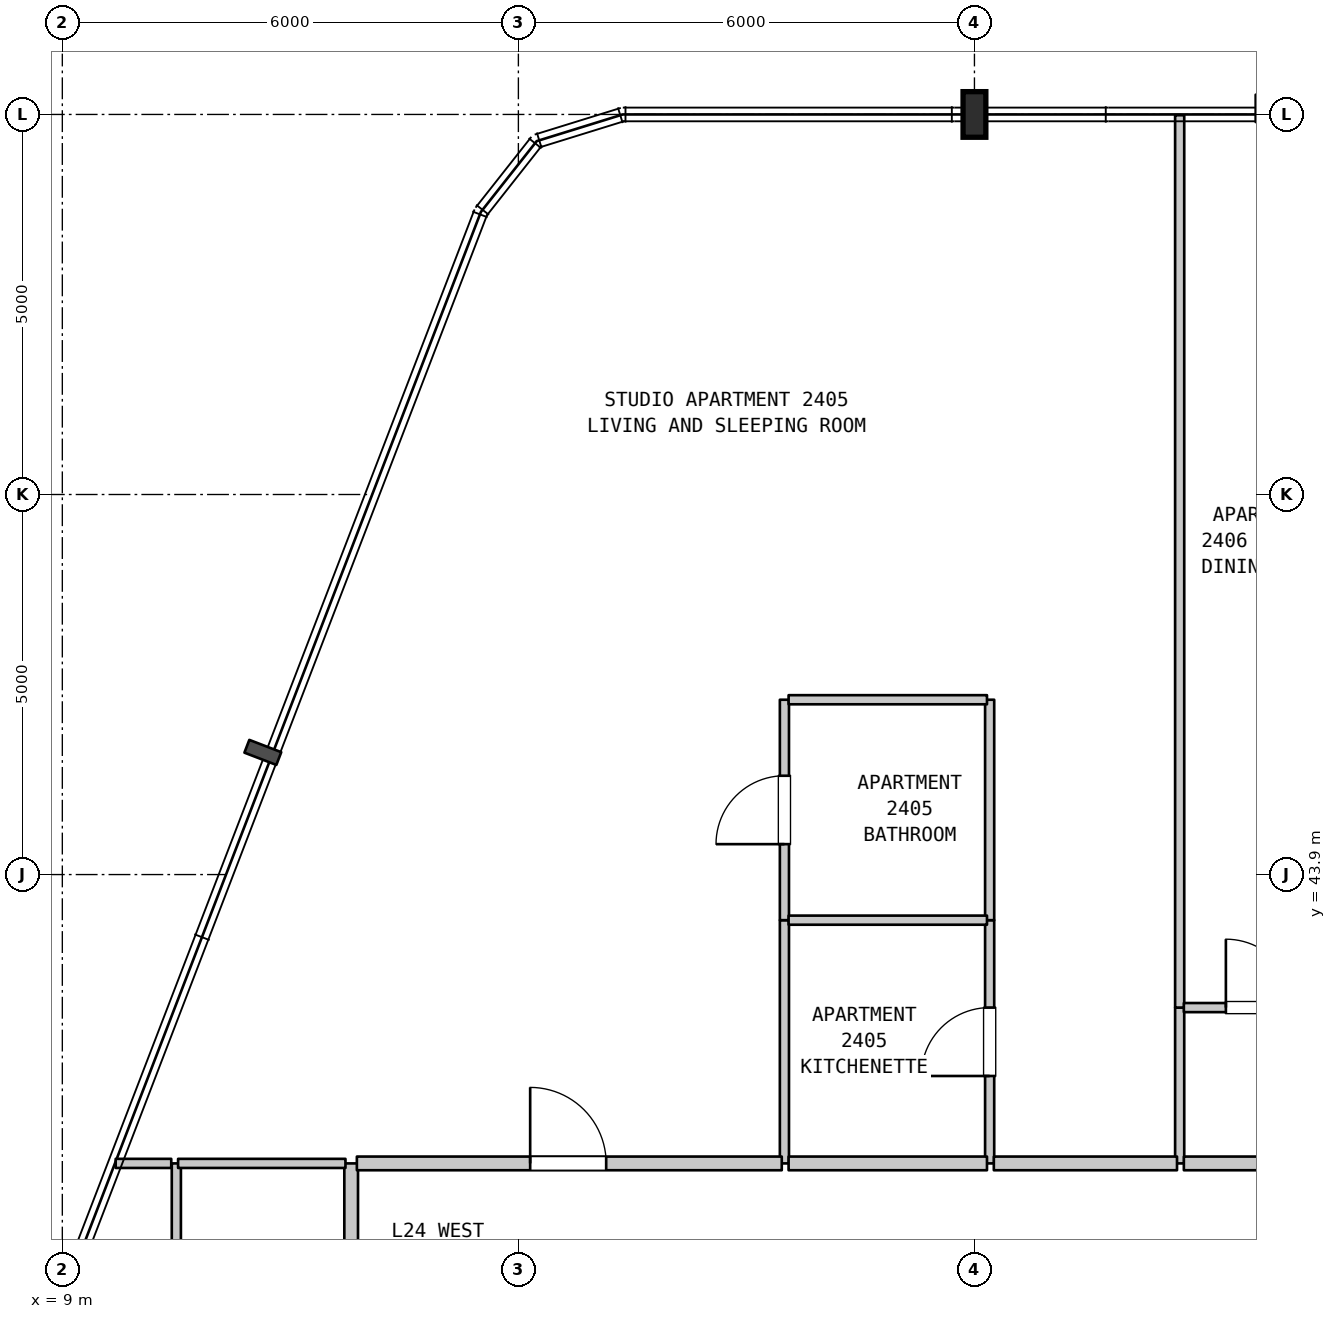
"""IFC4 building model, lengths in metres.
Left out: names, types, materials, properties, quantities, classifications, styles, units other than length and angle.
Written with IfcOpenShell. Run it as: python <this file> out.ifc"""

import sys

from ifc_helpers import new_model, si_unit, direction, frame, frame_2d, origin, origin_2d, place, context, subcontext, project, spatial, rectangle, i_section, extrude, element, fill, save


model = new_model("IFC4")
c1 = context("Model", 3, precision=1e-05, world=origin(), true_north=direction((0.0, 1.0)))
c2 = subcontext(c1, "Body", "Model", "MODEL_VIEW")
j1 = project(units=[si_unit("LENGTHUNIT", "METRE"), si_unit("PLANEANGLEUNIT", "RADIAN")], contexts=[c1])
p1 = place(None, origin())
s1 = spatial("IfcSite", under=j1, at=p1, CompositionType="ELEMENT")
p2 = place(p1, origin())
s2 = spatial("IfcBuilding", under=s1, at=p2, CompositionType="ELEMENT")
p3 = place(p2, frame((0.0, 0.0, 102.0)))
s3 = spatial("IfcBuildingStorey", under=s2, at=p3, CompositionType="ELEMENT", Elevation=102.0)
p4 = place(p3, frame((21.0, 53.9, 0.0), z_axis=(0.0, 0.0, 1.0), x_axis=(1.0, 0.0, 0.0)))
e1 = element("IfcColumn", 1, at=p4, inside=s3, PredefinedType="COLUMN", context=c2, shape_type="SweptSolid", body=[
    extrude(i_section(OverallWidth=0.3, OverallDepth=0.6, WebThickness=0.015, FlangeThickness=0.03, FilletRadius=0.027, at=origin_2d()), origin(), (0.0, 0.0, 1.0), 3.7),
])
p5 = place(p3, frame((10.5, 31.45, 0.0), z_axis=(0.0, 0.0, 1.0), x_axis=(0.0, 1.0, 0.0)))
e2 = element("IfcWall", 2, at=p5, inside=s3, PredefinedType="PARTITIONING", context=c2, shape_type="SweptSolid", body=[
    extrude(rectangle(XDim=8.65, YDim=0.12, at=frame_2d((4.325, 0.0))), origin(), (0.0, 0.0, 1.0), 3.385),
])
p6 = place(p3, frame((12.8, 31.45, 0.0), z_axis=(0.0, 0.0, 1.0), x_axis=(0.0, 1.0, 0.0)))
e3 = element("IfcWall", 3, at=p6, inside=s3, PredefinedType="STANDARD", context=c2, shape_type="SweptSolid", body=[
    extrude(rectangle(XDim=8.65, YDim=0.18, at=frame_2d((4.325, 0.0))), origin(), (0.0, 0.0, 1.0), 3.385),
])
p7 = place(p3, frame((18.5, 40.1, 0.0), z_axis=(0.0, 0.0, 1.0), x_axis=(0.0, 1.0, 0.0)))
e4 = element("IfcWall", 4, at=p7, inside=s3, PredefinedType="PARTITIONING", context=c2, shape_type="SweptSolid", body=[
    extrude(rectangle(XDim=3.2, YDim=0.12, at=frame_2d((1.6, 0.0))), origin(), (0.0, 0.0, 1.0), 3.385),
])
p8 = place(p3, frame((18.5, 43.3, 0.0), z_axis=(0.0, 0.0, 1.0), x_axis=(0.0, 1.0, 0.0)))
e5 = element("IfcWall", 5, at=p8, inside=s3, PredefinedType="PARTITIONING", context=c2, shape_type="SweptSolid", body=[
    extrude(rectangle(XDim=2.9, YDim=0.12, at=frame_2d((1.45, 0.0))), origin(), (0.0, 0.0, 1.0), 3.385),
])
p9 = place(p8, frame((1.0, 0.0, 0.0)))
e6 = element("IfcOpeningElement", 6, at=p9, cuts=e5, PredefinedType="OPENING", context=c2, shape_type="SweptSolid", body=[
    extrude(rectangle(XDim=0.9, YDim=2.1, at=frame_2d((0.45, 1.05))), frame((0.0, 0.07, 0.0), z_axis=(0.0, -1.0, 0.0), x_axis=(1.0, 0.0, 0.0)), (0.0, 0.0, 1.0), 0.14),
])
p10 = place(p3, frame((21.2, 40.1, 0.0), z_axis=(0.0, 0.0, 1.0), x_axis=(0.0, 1.0, 0.0)))
e7 = element("IfcWall", 7, at=p10, inside=s3, PredefinedType="PARTITIONING", context=c2, shape_type="SweptSolid", body=[
    extrude(rectangle(XDim=3.2, YDim=0.12, at=frame_2d((1.6, 0.0))), origin(), (0.0, 0.0, 1.0), 3.385),
])
p11 = place(p10, frame((1.15, 0.0, 0.0)))
e8 = element("IfcOpeningElement", 8, at=p11, cuts=e7, PredefinedType="OPENING", context=c2, shape_type="SweptSolid", body=[
    extrude(rectangle(XDim=0.9, YDim=2.15, at=frame_2d((0.45, 1.075))), frame((0.0, 0.07, 0.0), z_axis=(0.0, -1.0, 0.0), x_axis=(1.0, 0.0, 0.0)), (0.0, 0.0, 1.0), 0.14),
])
p12 = place(p3, frame((21.2, 43.3, 0.0), z_axis=(0.0, 0.0, 1.0), x_axis=(0.0, 1.0, 0.0)))
e9 = element("IfcWall", 9, at=p12, inside=s3, PredefinedType="PARTITIONING", context=c2, shape_type="SweptSolid", body=[
    extrude(rectangle(XDim=2.9, YDim=0.12, at=frame_2d((1.45, 0.0))), origin(), (0.0, 0.0, 1.0), 3.385),
])
p13 = place(p3, frame((23.7, 40.1, 0.0), z_axis=(0.0, 0.0, 1.0), x_axis=(0.0, 1.0, 0.0)))
e10 = element("IfcWall", 10, at=p13, inside=s3, PredefinedType="PARTITIONING", context=c2, shape_type="SweptSolid", body=[
    extrude(rectangle(XDim=2.05, YDim=0.12, at=frame_2d((1.025, 0.0))), origin(), (0.0, 0.0, 1.0), 3.385),
])
p14 = place(p3, frame((23.7, 42.15, 0.0), z_axis=(0.0, 0.0, 1.0), x_axis=(0.0, 1.0, 0.0)))
e11 = element("IfcWall", 11, at=p14, inside=s3, PredefinedType="PARTITIONING", context=c2, shape_type="SweptSolid", body=[
    extrude(rectangle(XDim=11.74, YDim=0.12, at=frame_2d((5.87, 0.0))), origin(), (0.0, 0.0, 1.0), 3.385),
])
p15 = place(p3, frame((9.702, 40.1, 0.0), z_axis=(0.0, 0.0, 1.0), x_axis=(1.0, 0.0, 0.0)))
e12 = element("IfcWall", 12, at=p15, inside=s3, PredefinedType="PARTITIONING", context=c2, shape_type="SweptSolid", body=[
    extrude(rectangle(XDim=0.731, YDim=0.12, at=frame_2d((0.366, 0.0))), origin(), (0.0, 0.0, 1.0), 3.385),
])
p16 = place(p3, frame((10.523, 40.1, 0.0), z_axis=(0.0, 0.0, 1.0), x_axis=(1.0, 0.0, 0.0)))
e13 = element("IfcWall", 13, at=p16, inside=s3, PredefinedType="PARTITIONING", context=c2, shape_type="SweptSolid", body=[
    extrude(rectangle(XDim=2.202, YDim=0.12, at=frame_2d((1.101, 0.0))), origin(), (0.0, 0.0, 1.0), 3.385),
])
p17 = place(p3, frame((12.875, 40.1, 0.0), z_axis=(0.0, 0.0, 1.0), x_axis=(1.0, 0.0, 0.0)))
e14 = element("IfcWall", 14, at=p17, inside=s3, PredefinedType="STANDARD", context=c2, shape_type="SweptSolid", body=[
    extrude(rectangle(XDim=5.59, YDim=0.18, at=frame_2d((2.795, 0.0))), origin(), (0.0, 0.0, 1.0), 3.385),
])
p18 = place(p17, frame((2.28, 0.0, 0.0)))
e15 = element("IfcOpeningElement", 15, at=p18, cuts=e14, PredefinedType="OPENING", context=c2, shape_type="SweptSolid", body=[
    extrude(rectangle(XDim=1.0, YDim=2.15, at=frame_2d((0.5, 1.075))), frame((0.0, 0.1, 0.0), z_axis=(0.0, -1.0, 0.0), x_axis=(1.0, 0.0, 0.0)), (0.0, 0.0, 1.0), 0.2),
])
p19 = place(p3, frame((18.555, 40.1, 0.0), z_axis=(0.0, 0.0, 1.0), x_axis=(1.0, 0.0, 0.0)))
e16 = element("IfcWall", 16, at=p19, inside=s3, PredefinedType="STANDARD", context=c2, shape_type="SweptSolid", body=[
    extrude(rectangle(XDim=2.61, YDim=0.18, at=frame_2d((1.305, 0.0))), origin(), (0.0, 0.0, 1.0), 3.385),
])
p20 = place(p3, frame((21.255, 40.1, 0.0), z_axis=(0.0, 0.0, 1.0), x_axis=(1.0, 0.0, 0.0)))
e17 = element("IfcWall", 17, at=p20, inside=s3, PredefinedType="STANDARD", context=c2, shape_type="SweptSolid", body=[
    extrude(rectangle(XDim=2.41, YDim=0.18, at=frame_2d((1.205, 0.0))), origin(), (0.0, 0.0, 1.0), 3.385),
])
p21 = place(p3, frame((23.755, 40.1, 0.0), z_axis=(0.0, 0.0, 1.0), x_axis=(1.0, 0.0, 0.0)))
e18 = element("IfcWall", 18, at=p21, inside=s3, PredefinedType="STANDARD", context=c2, shape_type="SweptSolid", body=[
    extrude(rectangle(XDim=5.095, YDim=0.18, at=frame_2d((2.548, 0.0))), origin(), (0.0, 0.0, 1.0), 3.385),
])
p22 = place(p21, frame((2.08, 0.0, 0.0)))
e19 = element("IfcOpeningElement", 19, at=p22, cuts=e18, PredefinedType="OPENING", context=c2, shape_type="SweptSolid", body=[
    extrude(rectangle(XDim=1.0, YDim=2.15, at=frame_2d((0.5, 1.075))), frame((0.0, 0.1, 0.0), z_axis=(0.0, -1.0, 0.0), x_axis=(1.0, 0.0, 0.0)), (0.0, 0.0, 1.0), 0.2),
])
p23 = place(p3, frame((23.755, 42.15, 0.0), z_axis=(0.0, 0.0, 1.0), x_axis=(1.0, 0.0, 0.0)))
e20 = element("IfcWall", 20, at=p23, inside=s3, PredefinedType="PARTITIONING", context=c2, shape_type="SweptSolid", body=[
    extrude(rectangle(XDim=2.16, YDim=0.12, at=frame_2d((1.08, 0.0))), origin(), (0.0, 0.0, 1.0), 3.385),
])
p24 = place(p23, frame((0.553, 0.0, 0.0)))
e21 = element("IfcOpeningElement", 21, at=p24, cuts=e20, PredefinedType="OPENING", context=c2, shape_type="SweptSolid", body=[
    extrude(rectangle(XDim=0.9, YDim=2.15, at=frame_2d((0.45, 1.075))), frame((0.0, 0.07, 0.0), z_axis=(0.0, -1.0, 0.0), x_axis=(1.0, 0.0, 0.0)), (0.0, 0.0, 1.0), 0.14),
])
for number, where, z_axis, x_axis in (
    (22, (18.555, 43.3, 0.0), (0.0, 0.0, 1.0), (1.0, 0.0, 0.0)),
    (23, (18.555, 46.2, 0.0), (0.0, 0.0, 1.0), (1.0, 0.0, 0.0)),
):
    element("IfcWall", number, at=place(p3, frame(where, z_axis=z_axis, x_axis=x_axis)), inside=s3, PredefinedType="PARTITIONING", context=c2, shape_type="SweptSolid", body=[
        extrude(rectangle(XDim=2.61, YDim=0.12, at=frame_2d((1.305, 0.0))), origin(), (0.0, 0.0, 1.0), 3.385),
    ])
p25 = place(p9, origin())
e24 = element("IfcDoor", 24, at=p25, inside=s3, OperationType="SINGLE_SWING_LEFT", PredefinedType="DOOR", context=c2, shape_type="SweptSolid", body=[
    extrude(rectangle(XDim=0.9, YDim=2.1, at=frame_2d((0.45, 1.05))), frame((0.0, 0.025, 0.0), z_axis=(0.0, -1.0, 0.0), x_axis=(1.0, 0.0, 0.0)), (0.0, 0.0, 1.0), 0.05),
])
fill(e6, e24)
p26 = place(p11, origin())
e25 = element("IfcDoor", 25, at=p26, inside=s3, OperationType="SINGLE_SWING_LEFT", PredefinedType="DOOR", context=c2, shape_type="SweptSolid", body=[
    extrude(rectangle(XDim=0.9, YDim=2.15, at=frame_2d((0.45, 1.075))), frame((0.0, 0.025, 0.0), z_axis=(0.0, -1.0, 0.0), x_axis=(1.0, 0.0, 0.0)), (0.0, 0.0, 1.0), 0.05),
])
fill(e8, e25)
p27 = place(p18, origin())
e26 = element("IfcDoor", 26, at=p27, inside=s3, OperationType="SINGLE_SWING_LEFT", PredefinedType="DOOR", context=c2, shape_type="SweptSolid", body=[
    extrude(rectangle(XDim=1.0, YDim=2.15, at=frame_2d((0.5, 1.075))), frame((0.0, 0.025, 0.0), z_axis=(0.0, -1.0, 0.0), x_axis=(1.0, 0.0, 0.0)), (0.0, 0.0, 1.0), 0.05),
])
fill(e15, e26)
p28 = place(p24, origin())
e27 = element("IfcDoor", 27, at=p28, inside=s3, OperationType="SINGLE_SWING_LEFT", PredefinedType="DOOR", context=c2, shape_type="SweptSolid", body=[
    extrude(rectangle(XDim=0.9, YDim=2.15, at=frame_2d((0.45, 1.075))), frame((0.0, 0.025, 0.0), z_axis=(0.0, -1.0, 0.0), x_axis=(1.0, 0.0, 0.0)), (0.0, 0.0, 1.0), 0.05),
])
fill(e21, e27)
save(model, sys.argv[1])
